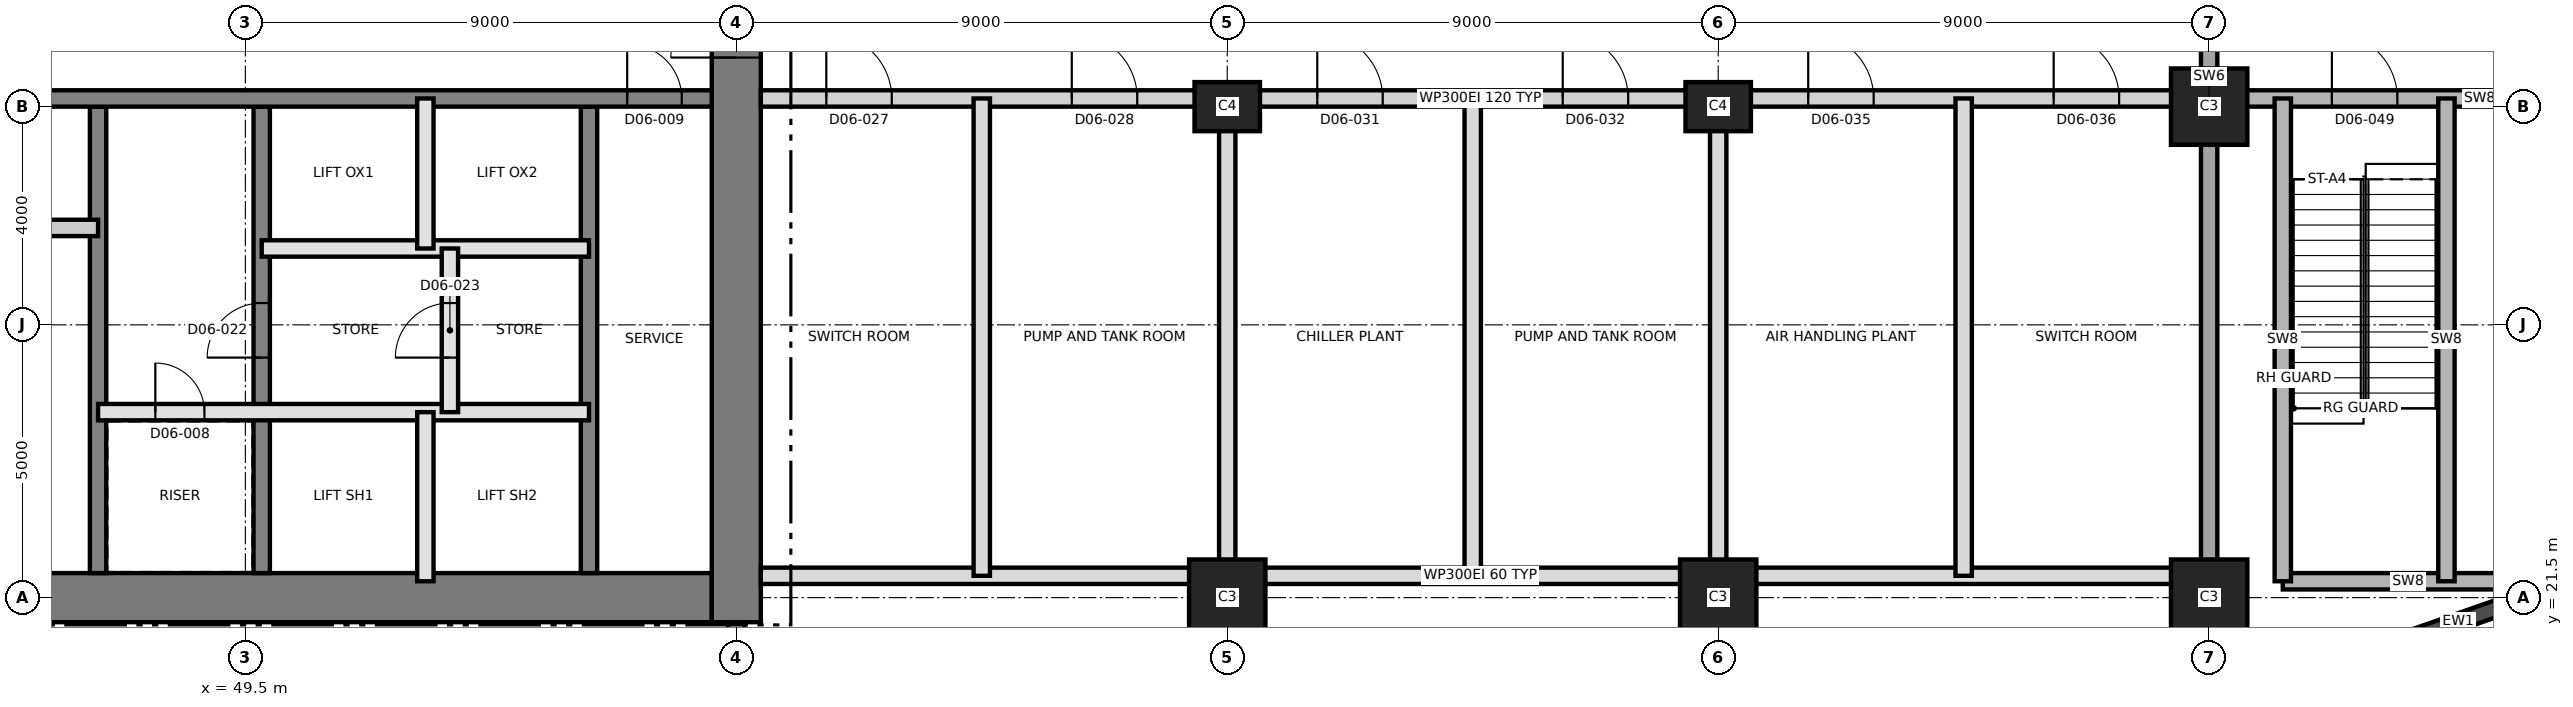
"""IFC4 building model, lengths in metres.
Left out: names, types, materials, properties, quantities, classifications, styles, units other than length and angle.
Written with IfcOpenShell. Run it as: python <this file> out.ifc"""

import sys

from ifc_helpers import new_model, si_unit, direction, frame, frame_2d, origin, origin_2d, place, context, subcontext, project, spatial, rectangle, extrude, element, fill, save


model = new_model("IFC4")
c1 = context("Model", 3, precision=1e-05, world=origin(), true_north=direction((0.0, 1.0)))
c2 = subcontext(c1, "Body", "Model", "MODEL_VIEW")
j1 = project(units=[si_unit("LENGTHUNIT", "METRE"), si_unit("PLANEANGLEUNIT", "RADIAN")], contexts=[c1])
p1 = place(None, origin())
s1 = spatial("IfcSite", under=j1, at=p1, CompositionType="ELEMENT")
p2 = place(p1, origin())
s2 = spatial("IfcBuilding", under=s1, at=p2, CompositionType="ELEMENT")
p3 = place(p2, frame((0.0, 0.0, 81.6)))
s3 = spatial("IfcBuildingStorey", under=s2, at=p3, CompositionType="ELEMENT", Elevation=81.6)
p4 = place(p3, frame((31.05, 21.5, 0.0), z_axis=(0.0, 0.0, 1.0), x_axis=(1.0, 0.0, 0.0)))
e1 = element("IfcWall", 1, at=p4, inside=s3, PredefinedType="SHEAR", context=c2, shape_type="SweptSolid", body=[
    extrude(rectangle(XDim=27.0, YDim=0.9, at=frame_2d((13.5, 0.0))), origin(), (0.0, 0.0, 1.0), 5.5),
])
p5 = place(p3, frame((58.5, 21.05, 0.0), z_axis=(0.0, 0.0, 1.0), x_axis=(0.0, 1.0, 0.0)))
e2 = element("IfcWall", 2, at=p5, inside=s3, PredefinedType="SHEAR", context=c2, shape_type="SweptSolid", body=[
    extrude(rectangle(XDim=18.9, YDim=0.9, at=frame_2d((9.45, 0.0))), origin(), (0.0, 0.0, 1.0), 5.5),
])
p6 = place(p5, frame((10.35, 0.0, 0.0)))
e3 = element("IfcOpeningElement", 3, at=p6, cuts=e2, PredefinedType="OPENING", context=c2, shape_type="SweptSolid", body=[
    extrude(rectangle(XDim=1.2, YDim=2.1, at=frame_2d((0.6, 1.05))), frame((0.0, 0.46, 0.0), z_axis=(0.0, -1.0, 0.0), x_axis=(1.0, 0.0, 0.0)), (0.0, 0.0, 1.0), 0.92),
])
p7 = place(p3, frame((46.8, 21.95, 0.0), z_axis=(0.0, 0.0, 1.0), x_axis=(0.0, 1.0, 0.0)))
e4 = element("IfcWall", 4, at=p7, inside=s3, PredefinedType="SHEAR", context=c2, shape_type="SweptSolid", body=[
    extrude(rectangle(XDim=8.55, YDim=0.3, at=frame_2d((4.275, 0.0))), origin(), (0.0, 0.0, 1.0), 5.5),
])
p8 = place(p3, frame((49.8, 21.95, 0.0), z_axis=(0.0, 0.0, 1.0), x_axis=(0.0, 1.0, 0.0)))
e5 = element("IfcWall", 5, at=p8, inside=s3, PredefinedType="SHEAR", context=c2, shape_type="SweptSolid", body=[
    extrude(rectangle(XDim=8.55, YDim=0.3, at=frame_2d((4.275, 0.0))), origin(), (0.0, 0.0, 1.0), 5.5),
])
p9 = place(p8, frame((3.95, 0.0, 0.0)))
e6 = element("IfcOpeningElement", 6, at=p9, cuts=e5, PredefinedType="OPENING", context=c2, shape_type="SweptSolid", body=[
    extrude(rectangle(XDim=1.0, YDim=2.1, at=frame_2d((0.5, 1.05))), frame((0.0, 0.16, 0.0), z_axis=(0.0, -1.0, 0.0), x_axis=(1.0, 0.0, 0.0)), (0.0, 0.0, 1.0), 0.32),
])
p10 = place(p3, frame((55.8, 21.95, 0.0), z_axis=(0.0, 0.0, 1.0), x_axis=(0.0, 1.0, 0.0)))
e7 = element("IfcWall", 7, at=p10, inside=s3, PredefinedType="SHEAR", context=c2, shape_type="SweptSolid", body=[
    extrude(rectangle(XDim=8.55, YDim=0.3, at=frame_2d((4.275, 0.0))), origin(), (0.0, 0.0, 1.0), 5.5),
])
p11 = place(p3, frame((31.95, 30.65, 0.0), z_axis=(0.0, 0.0, 1.0), x_axis=(1.0, 0.0, 0.0)))
e8 = element("IfcWall", 8, at=p11, inside=s3, PredefinedType="SHEAR", context=c2, shape_type="SweptSolid", body=[
    extrude(rectangle(XDim=26.1, YDim=0.3, at=frame_2d((13.05, 0.0))), origin(), (0.0, 0.0, 1.0), 5.5),
])
p12 = place(p11, frame((24.55, 0.0, 0.0)))
e9 = element("IfcOpeningElement", 9, at=p12, cuts=e8, PredefinedType="OPENING", context=c2, shape_type="SweptSolid", body=[
    extrude(rectangle(XDim=1.0, YDim=2.1, at=frame_2d((0.5, 1.05))), frame((0.0, 0.16, 0.0), z_axis=(0.0, -1.0, 0.0), x_axis=(1.0, 0.0, 0.0)), (0.0, 0.0, 1.0), 0.32),
])
p13 = place(p11, frame((11.35, 0.0, 0.0)))
e10 = element("IfcOpeningElement", 10, at=p13, cuts=e8, PredefinedType="OPENING", context=c2, shape_type="SweptSolid", body=[
    extrude(rectangle(XDim=1.0, YDim=2.1, at=frame_2d((0.5, 1.05))), frame((0.0, 0.16, 0.0), z_axis=(0.0, -1.0, 0.0), x_axis=(1.0, 0.0, 0.0)), (0.0, 0.0, 1.0), 0.32),
])
for number, where, z_axis, x_axis in (
    (11, (67.5, 21.5, 0.0), (0.0, 0.0, 1.0), (1.0, 0.0, 0.0)),
    (12, (76.5, 21.5, 0.0), (0.0, 0.0, 1.0), (1.0, 0.0, 0.0)),
    (13, (85.5, 21.5, 0.0), (0.0, 0.0, 1.0), (1.0, 0.0, 0.0)),
):
    element("IfcColumn", number, at=place(p3, frame(where, z_axis=z_axis, x_axis=x_axis)), inside=s3, PredefinedType="COLUMN", context=c2, shape_type="SweptSolid", body=[
        extrude(rectangle(XDim=1.4, YDim=1.4, at=origin_2d()), origin(), (0.0, 0.0, 1.0), 5.5),
    ])
for number, where, z_axis, x_axis in (
    (14, (67.5, 30.5, 0.0), (0.0, 0.0, 1.0), (1.0, 0.0, 0.0)),
    (15, (76.5, 30.5, 0.0), (0.0, 0.0, 1.0), (1.0, 0.0, 0.0)),
):
    element("IfcColumn", number, at=place(p3, frame(where, z_axis=z_axis, x_axis=x_axis)), inside=s3, PredefinedType="COLUMN", context=c2, shape_type="SweptSolid", body=[
        extrude(rectangle(XDim=1.2, YDim=0.9, at=origin_2d()), origin(), (0.0, 0.0, 1.0), 5.5),
    ])
p14 = place(p3, frame((85.5, 30.5, 0.0), z_axis=(0.0, 0.0, 1.0), x_axis=(1.0, 0.0, 0.0)))
e16 = element("IfcColumn", 16, at=p14, inside=s3, PredefinedType="COLUMN", context=c2, shape_type="SweptSolid", body=[
    extrude(rectangle(XDim=1.4, YDim=1.4, at=origin_2d()), origin(), (0.0, 0.0, 1.0), 5.5),
])
p15 = place(p3, frame((85.5, 20.35, 0.0), z_axis=(0.0, 0.0, 1.0), x_axis=(0.0, 1.0, 0.0)))
e17 = element("IfcWall", 17, at=p15, inside=s3, PredefinedType="SHEAR", context=c2, shape_type="SweptSolid", body=[
    extrude(rectangle(XDim=20.3, YDim=0.3, at=frame_2d((10.15, 0.0))), origin(), (0.0, 0.0, 1.0), 5.5),
])
p16 = place(p15, frame((11.35, 0.0, 0.0)))
e18 = element("IfcOpeningElement", 18, at=p16, cuts=e17, PredefinedType="OPENING", context=c2, shape_type="SweptSolid", body=[
    extrude(rectangle(XDim=1.4, YDim=2.1, at=frame_2d((0.7, 1.05))), frame((0.0, 0.16, 0.0), z_axis=(0.0, -1.0, 0.0), x_axis=(1.0, 0.0, 0.0)), (0.0, 0.0, 1.0), 0.32),
])
p17 = place(p3, frame((87.499, 20.158, 0.0), z_axis=(0.0, 0.0, 1.0), x_axis=(0.943879346284, 0.330290447423, 0.0)))
e19 = element("IfcWall", 19, at=p17, inside=s3, PredefinedType="SOLIDWALL", context=c2, shape_type="SweptSolid", body=[
    extrude(rectangle(XDim=5.439, YDim=0.3, at=frame_2d((2.72, 0.0))), origin(), (0.0, 0.0, 1.0), 5.2),
])
p18 = place(p3, frame((46.8, 24.9, 0.0), z_axis=(0.0, 0.0, 1.0), x_axis=(1.0, 0.0, 0.0)))
e20 = element("IfcWall", 20, at=p18, inside=s3, PredefinedType="SOLIDWALL", context=c2, shape_type="SweptSolid", body=[
    extrude(rectangle(XDim=9.0, YDim=0.3, at=frame_2d((4.5, 0.0))), origin(), (0.0, 0.0, 1.0), 5.2),
])
p19 = place(p18, frame((1.05, 0.0, 0.0)))
e21 = element("IfcOpeningElement", 21, at=p19, cuts=e20, PredefinedType="OPENING", context=c2, shape_type="SweptSolid", body=[
    extrude(rectangle(XDim=0.9, YDim=2.1, at=frame_2d((0.45, 1.05))), frame((0.0, 0.16, 0.0), z_axis=(0.0, -1.0, 0.0), x_axis=(1.0, 0.0, 0.0)), (0.0, 0.0, 1.0), 0.32),
])
p20 = place(p3, frame((49.8, 27.9, 0.0), z_axis=(0.0, 0.0, 1.0), x_axis=(1.0, 0.0, 0.0)))
e22 = element("IfcWall", 22, at=p20, inside=s3, PredefinedType="SOLIDWALL", context=c2, shape_type="SweptSolid", body=[
    extrude(rectangle(XDim=6.0, YDim=0.3, at=frame_2d((3.0, 0.0))), origin(), (0.0, 0.0, 1.0), 5.2),
])
p21 = place(p3, frame((40.8, 28.277, 0.0), z_axis=(0.0, 0.0, 1.0), x_axis=(1.0, 0.0, 0.0)))
e23 = element("IfcWall", 23, at=p21, inside=s3, PredefinedType="PARTITIONING", context=c2, shape_type="SweptSolid", body=[
    extrude(rectangle(XDim=6.0, YDim=0.3, at=frame_2d((3.0, 0.0))), origin(), (0.0, 0.0, 1.0), 5.2),
])
p22 = place(p3, frame((52.8, 21.8, 0.0), z_axis=(0.0, 0.0, 1.0), x_axis=(0.0, 1.0, 0.0)))
e24 = element("IfcWall", 24, at=p22, inside=s3, PredefinedType="SOLIDWALL", context=c2, shape_type="SweptSolid", body=[
    extrude(rectangle(XDim=3.1, YDim=0.3, at=frame_2d((1.55, 0.0))), origin(), (0.0, 0.0, 1.0), 5.2),
])
p23 = place(p3, frame((52.8, 27.9, 0.0), z_axis=(0.0, 0.0, 1.0), x_axis=(0.0, 1.0, 0.0)))
e25 = element("IfcWall", 25, at=p23, inside=s3, PredefinedType="SOLIDWALL", context=c2, shape_type="SweptSolid", body=[
    extrude(rectangle(XDim=2.75, YDim=0.3, at=frame_2d((1.375, 0.0))), origin(), (0.0, 0.0, 1.0), 5.2),
])
p24 = place(p3, frame((53.25, 24.9, 0.0), z_axis=(0.0, 0.0, 1.0), x_axis=(0.0, 1.0, 0.0)))
e26 = element("IfcWall", 26, at=p24, inside=s3, PredefinedType="SOLIDWALL", context=c2, shape_type="SweptSolid", body=[
    extrude(rectangle(XDim=3.0, YDim=0.3, at=frame_2d((1.5, 0.0))), origin(), (0.0, 0.0, 1.0), 5.2),
])
p25 = place(p24, frame((1.0, 0.0, 0.0)))
e27 = element("IfcOpeningElement", 27, at=p25, cuts=e26, PredefinedType="OPENING", context=c2, shape_type="SweptSolid", body=[
    extrude(rectangle(XDim=1.0, YDim=2.1, at=frame_2d((0.5, 1.05))), frame((0.0, 0.16, 0.0), z_axis=(0.0, -1.0, 0.0), x_axis=(1.0, 0.0, 0.0)), (0.0, 0.0, 1.0), 0.32),
])
p26 = place(p3, frame((86.85, 21.8, 0.0), z_axis=(0.0, 0.0, 1.0), x_axis=(1.0, 0.0, 0.0)))
e28 = element("IfcWall", 28, at=p26, inside=s3, PredefinedType="SHEAR", context=c2, shape_type="SweptSolid", body=[
    extrude(rectangle(XDim=4.596, YDim=0.3, at=frame_2d((2.298, 0.0))), origin(), (0.0, 0.0, 1.0), 5.2),
])
p27 = place(p3, frame((58.95, 21.9, 0.0), z_axis=(0.0, 0.0, 1.0), x_axis=(1.0, 0.0, 0.0)))
e29 = element("IfcWall", 29, at=p27, inside=s3, PredefinedType="PARTITIONING", context=c2, shape_type="SweptSolid", body=[
    extrude(rectangle(XDim=26.38, YDim=0.3, at=frame_2d((13.19, 0.0))), origin(), (0.0, 0.0, 1.0), 5.2),
])
p28 = place(p3, frame((58.95, 30.65, 0.0), z_axis=(0.0, 0.0, 1.0), x_axis=(1.0, 0.0, 0.0)))
e30 = element("IfcWall", 30, at=p28, inside=s3, PredefinedType="PARTITIONING", context=c2, shape_type="SweptSolid", body=[
    extrude(rectangle(XDim=26.38, YDim=0.3, at=frame_2d((13.19, 0.0))), origin(), (0.0, 0.0, 1.0), 5.2),
])
p29 = place(p28, frame((1.2, 0.0, 0.0)))
e31 = element("IfcOpeningElement", 31, at=p29, cuts=e30, PredefinedType="OPENING", context=c2, shape_type="SweptSolid", body=[
    extrude(rectangle(XDim=1.2, YDim=2.1, at=frame_2d((0.6, 1.05))), frame((0.0, 0.16, 0.0), z_axis=(0.0, -1.0, 0.0), x_axis=(1.0, 0.0, 0.0)), (0.0, 0.0, 1.0), 0.32),
])
p30 = place(p28, frame((5.7, 0.0, 0.0)))
e32 = element("IfcOpeningElement", 32, at=p30, cuts=e30, PredefinedType="OPENING", context=c2, shape_type="SweptSolid", body=[
    extrude(rectangle(XDim=1.2, YDim=2.1, at=frame_2d((0.6, 1.05))), frame((0.0, 0.16, 0.0), z_axis=(0.0, -1.0, 0.0), x_axis=(1.0, 0.0, 0.0)), (0.0, 0.0, 1.0), 0.32),
])
p31 = place(p28, frame((10.2, 0.0, 0.0)))
e33 = element("IfcOpeningElement", 33, at=p31, cuts=e30, PredefinedType="OPENING", context=c2, shape_type="SweptSolid", body=[
    extrude(rectangle(XDim=1.2, YDim=2.1, at=frame_2d((0.6, 1.05))), frame((0.0, 0.16, 0.0), z_axis=(0.0, -1.0, 0.0), x_axis=(1.0, 0.0, 0.0)), (0.0, 0.0, 1.0), 0.32),
])
p32 = place(p28, frame((14.7, 0.0, 0.0)))
e34 = element("IfcOpeningElement", 34, at=p32, cuts=e30, PredefinedType="OPENING", context=c2, shape_type="SweptSolid", body=[
    extrude(rectangle(XDim=1.2, YDim=2.1, at=frame_2d((0.6, 1.05))), frame((0.0, 0.16, 0.0), z_axis=(0.0, -1.0, 0.0), x_axis=(1.0, 0.0, 0.0)), (0.0, 0.0, 1.0), 0.32),
])
p33 = place(p28, frame((19.2, 0.0, 0.0)))
e35 = element("IfcOpeningElement", 35, at=p33, cuts=e30, PredefinedType="OPENING", context=c2, shape_type="SweptSolid", body=[
    extrude(rectangle(XDim=1.2, YDim=2.1, at=frame_2d((0.6, 1.05))), frame((0.0, 0.16, 0.0), z_axis=(0.0, -1.0, 0.0), x_axis=(1.0, 0.0, 0.0)), (0.0, 0.0, 1.0), 0.32),
])
p34 = place(p28, frame((23.7, 0.0, 0.0)))
e36 = element("IfcOpeningElement", 36, at=p34, cuts=e30, PredefinedType="OPENING", context=c2, shape_type="SweptSolid", body=[
    extrude(rectangle(XDim=1.2, YDim=2.1, at=frame_2d((0.6, 1.05))), frame((0.0, 0.16, 0.0), z_axis=(0.0, -1.0, 0.0), x_axis=(1.0, 0.0, 0.0)), (0.0, 0.0, 1.0), 0.32),
])
p35 = place(p3, frame((85.67, 30.65, 0.0), z_axis=(0.0, 0.0, 1.0), x_axis=(1.0, 0.0, 0.0)))
e37 = element("IfcWall", 37, at=p35, inside=s3, PredefinedType="SHEAR", context=c2, shape_type="SweptSolid", body=[
    extrude(rectangle(XDim=9.58, YDim=0.3, at=frame_2d((4.79, 0.0))), origin(), (0.0, 0.0, 1.0), 5.2),
])
p36 = place(p35, frame((2.08, 0.0, 0.0)))
e38 = element("IfcOpeningElement", 38, at=p36, cuts=e37, PredefinedType="OPENING", context=c2, shape_type="SweptSolid", body=[
    extrude(rectangle(XDim=1.2, YDim=2.1, at=frame_2d((0.6, 1.05))), frame((0.0, 0.16, 0.0), z_axis=(0.0, -1.0, 0.0), x_axis=(1.0, 0.0, 0.0)), (0.0, 0.0, 1.0), 0.32),
])
p37 = place(p35, frame((5.63, 0.0, 0.0)))
e39 = element("IfcOpeningElement", 39, at=p37, cuts=e37, PredefinedType="OPENING", context=c2, shape_type="SweptSolid", body=[
    extrude(rectangle(XDim=1.0, YDim=2.1, at=frame_2d((0.5, 1.05))), frame((0.0, 0.16, 0.0), z_axis=(0.0, -1.0, 0.0), x_axis=(1.0, 0.0, 0.0)), (0.0, 0.0, 1.0), 0.32),
])
for number, where, z_axis, x_axis in (
    (40, (63.0, 21.9, 0.0), (0.0, 0.0, 1.0), (0.0, 1.0, 0.0)),
    (41, (67.5, 21.9, 0.0), (0.0, 0.0, 1.0), (0.0, 1.0, 0.0)),
    (42, (72.0, 21.9, 0.0), (0.0, 0.0, 1.0), (0.0, 1.0, 0.0)),
    (43, (76.5, 21.9, 0.0), (0.0, 0.0, 1.0), (0.0, 1.0, 0.0)),
    (44, (81.0, 21.9, 0.0), (0.0, 0.0, 1.0), (0.0, 1.0, 0.0)),
):
    element("IfcWall", number, at=place(p3, frame(where, z_axis=z_axis, x_axis=x_axis)), inside=s3, PredefinedType="PARTITIONING", context=c2, shape_type="SweptSolid", body=[
        extrude(rectangle(XDim=8.75, YDim=0.3, at=frame_2d((4.375, 0.0))), origin(), (0.0, 0.0, 1.0), 5.2),
    ])
for number, where, z_axis, x_axis in (
    (45, (86.85, 21.8, 0.0), (0.0, 0.0, 1.0), (0.0, 1.0, 0.0)),
    (46, (89.85, 21.8, 0.0), (0.0, 0.0, 1.0), (0.0, 1.0, 0.0)),
):
    element("IfcWall", number, at=place(p3, frame(where, z_axis=z_axis, x_axis=x_axis)), inside=s3, PredefinedType="SHEAR", context=c2, shape_type="SweptSolid", body=[
        extrude(rectangle(XDim=8.85, YDim=0.3, at=frame_2d((4.425, 0.0))), origin(), (0.0, 0.0, 1.0), 5.2),
    ])
p38 = place(p3, frame((58.5, 21.05, 0.0), z_axis=(0.0, 0.0, 1.0), x_axis=(0.0, -1.0, 0.0)))
e47 = element("IfcWall", 47, at=p38, inside=s3, PredefinedType="PARTITIONING", context=c2, shape_type="SweptSolid", body=[
    extrude(rectangle(XDim=0.74, YDim=0.3, at=frame_2d((0.37, 0.0))), origin(), (0.0, 0.0, 1.0), 5.2),
])
p39 = place(p19, origin())
e48 = element("IfcDoor", 48, at=p39, inside=s3, OperationType="SINGLE_SWING_RIGHT", PredefinedType="DOOR", context=c2, shape_type="SweptSolid", body=[
    extrude(rectangle(XDim=0.9, YDim=2.1, at=frame_2d((0.45, 1.05))), frame((0.0, 0.025, 0.0), z_axis=(0.0, -1.0, 0.0), x_axis=(1.0, 0.0, 0.0)), (0.0, 0.0, 1.0), 0.05),
])
fill(e21, e48)
p40 = place(p12, origin())
e49 = element("IfcDoor", 49, at=p40, inside=s3, OperationType="SINGLE_SWING_LEFT", PredefinedType="DOOR", context=c2, shape_type="SweptSolid", body=[
    extrude(rectangle(XDim=1.0, YDim=2.1, at=frame_2d((0.5, 1.05))), frame((0.0, 0.025, 0.0), z_axis=(0.0, -1.0, 0.0), x_axis=(1.0, 0.0, 0.0)), (0.0, 0.0, 1.0), 0.05),
])
fill(e9, e49)
p41 = place(p6, origin())
e50 = element("IfcDoor", 50, at=p41, inside=s3, OperationType="SINGLE_SWING_LEFT", PredefinedType="DOOR", context=c2, shape_type="SweptSolid", body=[
    extrude(rectangle(XDim=1.2, YDim=2.1, at=frame_2d((0.6, 1.05))), frame((0.0, 0.025, 0.0), z_axis=(0.0, -1.0, 0.0), x_axis=(1.0, 0.0, 0.0)), (0.0, 0.0, 1.0), 0.05),
])
fill(e3, e50)
p42 = place(p9, origin())
e51 = element("IfcDoor", 51, at=p42, inside=s3, OperationType="SINGLE_SWING_LEFT", PredefinedType="DOOR", context=c2, shape_type="SweptSolid", body=[
    extrude(rectangle(XDim=1.0, YDim=2.1, at=frame_2d((0.5, 1.05))), frame((0.0, 0.025, 0.0), z_axis=(0.0, -1.0, 0.0), x_axis=(1.0, 0.0, 0.0)), (0.0, 0.0, 1.0), 0.05),
])
fill(e6, e51)
p43 = place(p25, origin())
e52 = element("IfcDoor", 52, at=p43, inside=s3, OperationType="SINGLE_SWING_RIGHT", PredefinedType="DOOR", context=c2, shape_type="SweptSolid", body=[
    extrude(rectangle(XDim=1.0, YDim=2.1, at=frame_2d((0.5, 1.05))), frame((0.0, 0.025, 0.0), z_axis=(0.0, -1.0, 0.0), x_axis=(1.0, 0.0, 0.0)), (0.0, 0.0, 1.0), 0.05),
])
fill(e27, e52)
p44 = place(p29, origin())
e53 = element("IfcDoor", 53, at=p44, inside=s3, OperationType="SINGLE_SWING_RIGHT", PredefinedType="DOOR", context=c2, shape_type="SweptSolid", body=[
    extrude(rectangle(XDim=1.2, YDim=2.1, at=frame_2d((0.6, 1.05))), frame((0.0, 0.025, 0.0), z_axis=(0.0, -1.0, 0.0), x_axis=(1.0, 0.0, 0.0)), (0.0, 0.0, 1.0), 0.05),
])
fill(e31, e53)
p45 = place(p30, origin())
e54 = element("IfcDoor", 54, at=p45, inside=s3, OperationType="SINGLE_SWING_LEFT", PredefinedType="DOOR", context=c2, shape_type="SweptSolid", body=[
    extrude(rectangle(XDim=1.2, YDim=2.1, at=frame_2d((0.6, 1.05))), frame((0.0, 0.025, 0.0), z_axis=(0.0, -1.0, 0.0), x_axis=(1.0, 0.0, 0.0)), (0.0, 0.0, 1.0), 0.05),
])
fill(e32, e54)
p46 = place(p31, origin())
e55 = element("IfcDoor", 55, at=p46, inside=s3, OperationType="SINGLE_SWING_LEFT", PredefinedType="DOOR", context=c2, shape_type="SweptSolid", body=[
    extrude(rectangle(XDim=1.2, YDim=2.1, at=frame_2d((0.6, 1.05))), frame((0.0, 0.025, 0.0), z_axis=(0.0, -1.0, 0.0), x_axis=(1.0, 0.0, 0.0)), (0.0, 0.0, 1.0), 0.05),
])
fill(e33, e55)
p47 = place(p32, origin())
e56 = element("IfcDoor", 56, at=p47, inside=s3, OperationType="SINGLE_SWING_LEFT", PredefinedType="DOOR", context=c2, shape_type="SweptSolid", body=[
    extrude(rectangle(XDim=1.2, YDim=2.1, at=frame_2d((0.6, 1.05))), frame((0.0, 0.025, 0.0), z_axis=(0.0, -1.0, 0.0), x_axis=(1.0, 0.0, 0.0)), (0.0, 0.0, 1.0), 0.05),
])
fill(e34, e56)
p48 = place(p33, origin())
e57 = element("IfcDoor", 57, at=p48, inside=s3, OperationType="SINGLE_SWING_LEFT", PredefinedType="DOOR", context=c2, shape_type="SweptSolid", body=[
    extrude(rectangle(XDim=1.2, YDim=2.1, at=frame_2d((0.6, 1.05))), frame((0.0, 0.025, 0.0), z_axis=(0.0, -1.0, 0.0), x_axis=(1.0, 0.0, 0.0)), (0.0, 0.0, 1.0), 0.05),
])
fill(e35, e57)
p49 = place(p34, origin())
e58 = element("IfcDoor", 58, at=p49, inside=s3, OperationType="SINGLE_SWING_RIGHT", PredefinedType="DOOR", context=c2, shape_type="SweptSolid", body=[
    extrude(rectangle(XDim=1.2, YDim=2.1, at=frame_2d((0.6, 1.05))), frame((0.0, 0.025, 0.0), z_axis=(0.0, -1.0, 0.0), x_axis=(1.0, 0.0, 0.0)), (0.0, 0.0, 1.0), 0.05),
])
fill(e36, e58)
p50 = place(p36, origin())
e59 = element("IfcDoor", 59, at=p50, inside=s3, OperationType="SINGLE_SWING_LEFT", PredefinedType="DOOR", context=c2, shape_type="SweptSolid", body=[
    extrude(rectangle(XDim=1.2, YDim=2.1, at=frame_2d((0.6, 1.05))), frame((0.0, 0.025, 0.0), z_axis=(0.0, -1.0, 0.0), x_axis=(1.0, 0.0, 0.0)), (0.0, 0.0, 1.0), 0.05),
])
fill(e38, e59)
save(model, sys.argv[1])
